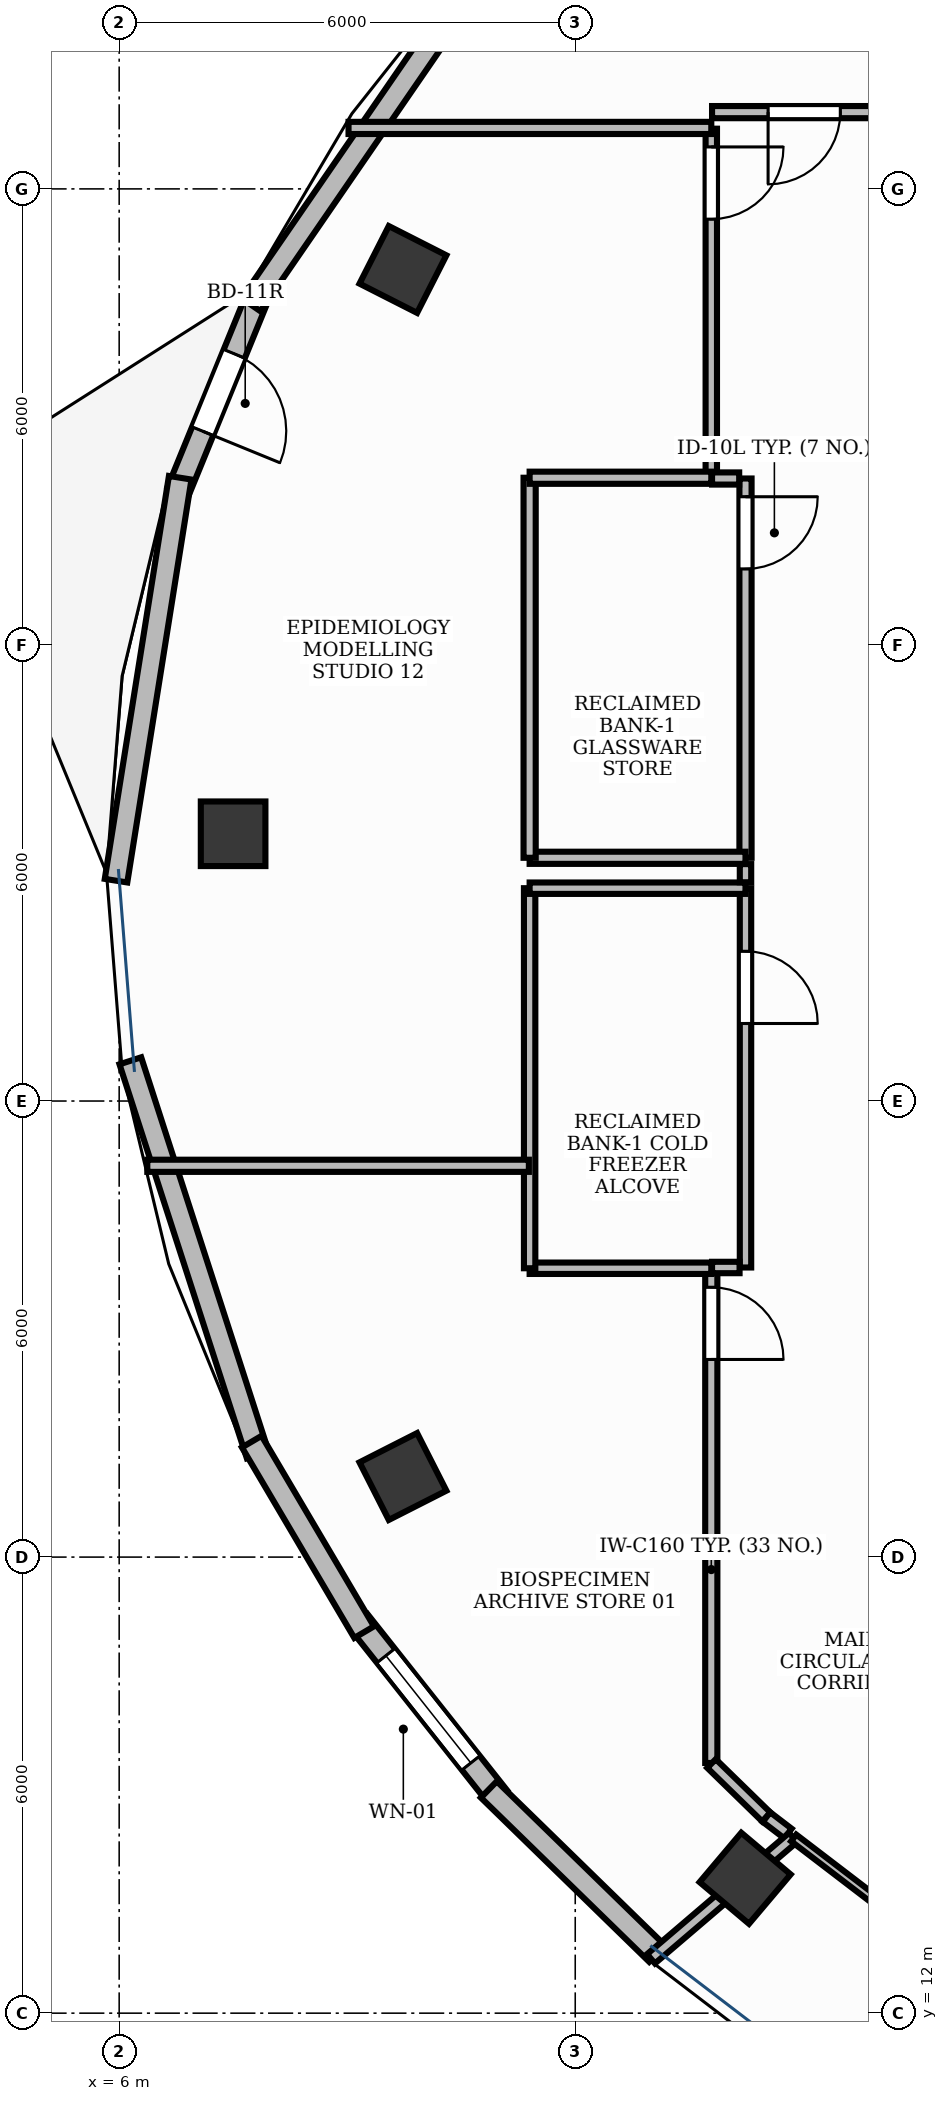
"""IFC4 building model, lengths in metres.
Left out: names, types, materials, properties, quantities, classifications, styles, units other than length and angle.
Written with IfcOpenShell. Run it as: python <this file> out.ifc"""

import sys

from ifc_helpers import new_model, si_unit, direction, frame, frame_2d, origin, origin_2d, place, context, subcontext, project, spatial, rectangle, extrude, element, fill, save


model = new_model("IFC4")
c1 = context("Model", 3, precision=1e-05, world=origin(), true_north=direction((0.0, 1.0)))
c2 = subcontext(c1, "Body", "Model", "MODEL_VIEW")
j1 = project(units=[si_unit("LENGTHUNIT", "METRE"), si_unit("PLANEANGLEUNIT", "RADIAN")], contexts=[c1])
p1 = place(None, origin())
s1 = spatial("IfcSite", under=j1, at=p1, CompositionType="ELEMENT")
p2 = place(p1, origin())
s2 = spatial("IfcBuilding", under=s1, at=p2, CompositionType="ELEMENT")
p3 = place(p2, frame((0.0, 0.0, 247.8)))
s3 = spatial("IfcBuildingStorey", under=s2, at=p3, CompositionType="ELEMENT", Elevation=247.8)
for number, where, z_axis, x_axis in (
    (1, (9.733, 34.94, -0.0), (0.0, 0.0, 1.0), (0.453, 0.891, 0.0)),
    (2, (7.499, 27.516, -0.0), (0.0, 0.0, 1.0), (0.0, 1.0, 0.0)),
    (3, (9.733, 19.06, -0.0), (0.0, 0.0, 1.0), (-0.453, 0.891, 0.0)),
    (4, (14.235, 13.775, -0.0), (0.0, 0.0, 1.0), (-0.764, 0.645, 0.0)),
):
    element("IfcColumn", number, at=place(p3, frame(where, z_axis=z_axis, x_axis=x_axis)), inside=s3, PredefinedType="COLUMN", context=c2, shape_type="SweptSolid", body=[
        extrude(rectangle(XDim=0.85, YDim=0.85, at=origin_2d()), origin(), (0.0, 0.0, 1.0), 3.901),
    ])
p4 = place(p3, frame((7.835, 34.616, 0.0), z_axis=(0.0, 0.0, 1.0), x_axis=(-0.378197778625, -0.925724818854, 0.0)))
e5 = element("IfcWall", 5, at=p4, inside=s3, PredefinedType="STANDARD", context=c2, shape_type="SweptSolid", body=[
    extrude(rectangle(XDim=2.797, YDim=0.3, at=frame_2d((1.398, 0.0))), origin(), (0.0, 0.0, 1.0), 3.9),
])
p5 = place(p4, frame((0.849, 0.0, 0.0)))
e6 = element("IfcOpeningElement", 6, at=p5, cuts=e5, PredefinedType="OPENING", context=c2, shape_type="SweptSolid", body=[
    extrude(rectangle(XDim=1.1, YDim=2.15, at=frame_2d((0.55, 1.075))), frame((0.0, 0.165, 0.0), z_axis=(0.0, -1.0, 0.0), x_axis=(1.0, 0.0, 0.0)), (0.0, 0.0, 1.0), 0.33),
])
p6 = place(p3, frame((9.15, 17.157, 0.0), z_axis=(0.0, 0.0, 1.0), x_axis=(0.620861534092, -0.783920248166, 0.0)))
e7 = element("IfcWall", 7, at=p6, inside=s3, PredefinedType="STANDARD", context=c2, shape_type="SweptSolid", body=[
    extrude(rectangle(XDim=2.957, YDim=0.3, at=frame_2d((1.479, 0.0))), origin(), (0.0, 0.0, 1.0), 3.9),
])
p7 = place(p6, frame((0.579, 0.0, 0.9)))
e8 = element("IfcOpeningElement", 8, at=p7, cuts=e7, PredefinedType="OPENING", context=c2, shape_type="SweptSolid", body=[
    extrude(rectangle(XDim=1.8, YDim=2.1, at=frame_2d((0.9, 1.05))), frame((0.0, 0.165, 0.0), z_axis=(0.0, -1.0, 0.0), x_axis=(1.0, 0.0, 0.0)), (0.0, 0.0, 1.0), 0.33),
])
p8 = place(p3, frame((10.984, 39.2, 0.0), z_axis=(0.0, 0.0, 1.0), x_axis=(-0.566669772846, -0.823945003349, 0.0)))
e9 = element("IfcWall", 9, at=p8, inside=s3, PredefinedType="STANDARD", context=c2, shape_type="SweptSolid", body=[
    extrude(rectangle(XDim=5.734, YDim=0.3, at=frame_2d((2.867, 0.0))), origin(), (0.0, 0.0, 1.0), 3.47),
])
p9 = place(p3, frame((6.803, 32.2, 0.0), z_axis=(0.0, 0.0, 1.0), x_axis=(-0.157240066957, -0.987560408959, 0.0)))
e10 = element("IfcWall", 10, at=p9, inside=s3, PredefinedType="STANDARD", context=c2, shape_type="SweptSolid", body=[
    extrude(rectangle(XDim=5.367, YDim=0.3, at=frame_2d((2.684, 0.0))), origin(), (0.0, 0.0, 1.0), 3.9),
])
p10 = place(p3, frame((6.147, 24.529, 0.0), z_axis=(0.0, 0.0, 1.0), x_axis=(0.307501658213, -0.951547544895, 0.0)))
e11 = element("IfcWall", 11, at=p10, inside=s3, PredefinedType="STANDARD", context=c2, shape_type="SweptSolid", body=[
    extrude(rectangle(XDim=5.447, YDim=0.3, at=frame_2d((2.724, 0.0))), origin(), (0.0, 0.0, 1.0), 3.9),
])
p11 = place(p3, frame((7.744, 19.519, 0.0), z_axis=(0.0, 0.0, 1.0), x_axis=(0.508064832988, -0.861318829169, 0.0)))
e12 = element("IfcWall", 12, at=p11, inside=s3, PredefinedType="STANDARD", context=c2, shape_type="SweptSolid", body=[
    extrude(rectangle(XDim=2.91, YDim=0.3, at=frame_2d((1.455, 0.0))), origin(), (0.0, 0.0, 1.0), 3.47),
])
p12 = place(p3, frame((10.863, 14.942, 0.0), z_axis=(0.0, 0.0, 1.0), x_axis=(0.71600802955, -0.698092043802, 0.0)))
e13 = element("IfcWall", 13, at=p12, inside=s3, PredefinedType="STANDARD", context=c2, shape_type="SweptSolid", body=[
    extrude(rectangle(XDim=3.093, YDim=0.3, at=frame_2d((1.547, 0.0))), origin(), (0.0, 0.0, 1.0), 3.47),
])
p13 = place(p3, frame((14.24, 26.8, 0.0), z_axis=(0.0, 0.0, 1.0), x_axis=(0.0, -1.0, 0.0)))
e14 = element("IfcWall", 14, at=p13, inside=s3, PredefinedType="PARTITIONING", context=c2, shape_type="SweptSolid", body=[
    extrude(rectangle(XDim=4.99, YDim=0.15, at=frame_2d((2.495, 0.0))), origin(), (0.0, 0.0, 1.0), 2.91),
])
p14 = place(p13, frame((0.83, 0.0, 0.0)))
e15 = element("IfcOpeningElement", 15, at=p14, cuts=e14, PredefinedType="OPENING", context=c2, shape_type="SweptSolid", body=[
    extrude(rectangle(XDim=0.95, YDim=2.15, at=frame_2d((0.475, 1.075))), frame((0.0, 0.09, 0.0), z_axis=(0.0, -1.0, 0.0), x_axis=(1.0, 0.0, 0.0)), (0.0, 0.0, 1.0), 0.18),
])
p15 = place(p3, frame((14.24, 32.19, 0.0), z_axis=(0.0, 0.0, 1.0), x_axis=(0.0, -1.0, 0.0)))
e16 = element("IfcWall", 16, at=p15, inside=s3, PredefinedType="PARTITIONING", context=c2, shape_type="SweptSolid", body=[
    extrude(rectangle(XDim=4.99, YDim=0.16, at=frame_2d((2.495, 0.0))), origin(), (0.0, 0.0, 1.0), 2.91),
])
p16 = place(p15, frame((0.24, 0.0, 0.0)))
e17 = element("IfcOpeningElement", 17, at=p16, cuts=e16, PredefinedType="OPENING", context=c2, shape_type="SweptSolid", body=[
    extrude(rectangle(XDim=0.95, YDim=2.15, at=frame_2d((0.475, 1.075))), frame((0.0, 0.095, 0.0), z_axis=(0.0, -1.0, 0.0), x_axis=(1.0, 0.0, 0.0)), (0.0, 0.0, 1.0), 0.19),
])
p17 = place(p3, frame((13.79, 21.79, 0.0), z_axis=(0.0, 0.0, 1.0), x_axis=(0.0, -1.0, 0.0)))
e18 = element("IfcWall", 18, at=p17, inside=s3, PredefinedType="PARTITIONING", context=c2, shape_type="SweptSolid", body=[
    extrude(rectangle(XDim=6.499, YDim=0.16, at=frame_2d((3.249, 0.0))), origin(), (0.0, 0.0, 1.0), 2.91),
])
p18 = place(p17, frame((0.24, 0.0, 0.0)))
e19 = element("IfcOpeningElement", 19, at=p18, cuts=e18, PredefinedType="OPENING", context=c2, shape_type="SweptSolid", body=[
    extrude(rectangle(XDim=0.95, YDim=2.15, at=frame_2d((0.475, 1.075))), frame((0.0, 0.095, 0.0), z_axis=(0.0, -1.0, 0.0), x_axis=(1.0, 0.0, 0.0)), (0.0, 0.0, 1.0), 0.19),
])
p19 = place(p3, frame((17.237, 37.01, 0.0), z_axis=(0.0, 0.0, 1.0), x_axis=(-1.0, 0.0, 0.0)))
e20 = element("IfcWall", 20, at=p19, inside=s3, PredefinedType="PARTITIONING", context=c2, shape_type="SweptSolid", body=[
    extrude(rectangle(XDim=3.437, YDim=0.16, at=frame_2d((1.718, 0.0))), origin(), (0.0, 0.0, 1.0), 2.91),
])
p20 = place(p19, frame((1.75, 0.0, 0.0)))
e21 = element("IfcOpeningElement", 21, at=p20, cuts=e20, PredefinedType="OPENING", context=c2, shape_type="SweptSolid", body=[
    extrude(rectangle(XDim=0.95, YDim=2.15, at=frame_2d((0.475, 1.075))), frame((0.0, 0.095, 0.0), z_axis=(0.0, -1.0, 0.0), x_axis=(1.0, 0.0, 0.0)), (0.0, 0.0, 1.0), 0.19),
])
p21 = place(p3, frame((13.79, 36.792, 0.0), z_axis=(0.0, 0.0, 1.0), x_axis=(0.0, -1.0, 0.0)))
e22 = element("IfcWall", 22, at=p21, inside=s3, PredefinedType="PARTITIONING", context=c2, shape_type="SweptSolid", body=[
    extrude(rectangle(XDim=4.582, YDim=0.15, at=frame_2d((2.291, 0.0))), origin(), (0.0, 0.0, 1.0), 2.91),
])
p22 = place(p21, frame((0.24, 0.0, 0.0)))
e23 = element("IfcOpeningElement", 23, at=p22, cuts=e22, PredefinedType="OPENING", context=c2, shape_type="SweptSolid", body=[
    extrude(rectangle(XDim=0.95, YDim=2.15, at=frame_2d((0.475, 1.075))), frame((0.0, 0.09, 0.0), z_axis=(0.0, -1.0, 0.0), x_axis=(1.0, 0.0, 0.0)), (0.0, 0.0, 1.0), 0.18),
])
p23 = place(p3, frame((14.162, 21.81, 0.0), z_axis=(0.0, 0.0, 1.0), x_axis=(-1.0, 0.0, 0.0)))
e24 = element("IfcWall", 24, at=p23, inside=s3, PredefinedType="PARTITIONING", context=c2, shape_type="SweptSolid", body=[
    extrude(rectangle(XDim=0.362, YDim=0.15, at=frame_2d((0.181, 0.0))), origin(), (0.0, 0.0, 1.0), 2.91),
])
p24 = place(p3, frame((13.79, 21.8, 0.0), z_axis=(0.0, 0.0, 1.0), x_axis=(-1.0, 0.0, 0.0)))
e25 = element("IfcWall", 25, at=p24, inside=s3, PredefinedType="PARTITIONING", context=c2, shape_type="SweptSolid", body=[
    extrude(rectangle(XDim=2.39, YDim=0.15, at=frame_2d((1.195, 0.0))), origin(), (0.0, 0.0, 1.0), 2.91),
])
p25 = place(p3, frame((11.4, 21.8, 0.0), z_axis=(0.0, 0.0, 1.0), x_axis=(0.0, 1.0, 0.0)))
e26 = element("IfcWall", 26, at=p25, inside=s3, PredefinedType="PARTITIONING", context=c2, shape_type="SweptSolid", body=[
    extrude(rectangle(XDim=5.0, YDim=0.15, at=frame_2d((2.5, 0.0))), origin(), (0.0, 0.0, 1.0), 2.91),
])
p26 = place(p3, frame((11.4, 26.8, 0.0), z_axis=(0.0, 0.0, 1.0), x_axis=(1.0, 0.0, 0.0)))
e27 = element("IfcWall", 27, at=p26, inside=s3, PredefinedType="PARTITIONING", context=c2, shape_type="SweptSolid", body=[
    extrude(rectangle(XDim=2.84, YDim=0.15, at=frame_2d((1.42, 0.0))), origin(), (0.0, 0.0, 1.0), 2.91),
])
p27 = place(p3, frame((13.8, 32.19, 0.0), z_axis=(0.0, 0.0, 1.0), x_axis=(1.0, 0.0, 0.0)))
e28 = element("IfcWall", 28, at=p27, inside=s3, PredefinedType="PARTITIONING", context=c2, shape_type="SweptSolid", body=[
    extrude(rectangle(XDim=0.357, YDim=0.16, at=frame_2d((0.178, 0.0))), origin(), (0.0, 0.0, 1.0), 2.91),
])
p28 = place(p3, frame((14.24, 27.2, 0.0), z_axis=(0.0, 0.0, 1.0), x_axis=(-1.0, 0.0, 0.0)))
e29 = element("IfcWall", 29, at=p28, inside=s3, PredefinedType="PARTITIONING", context=c2, shape_type="SweptSolid", body=[
    extrude(rectangle(XDim=2.84, YDim=0.16, at=frame_2d((1.42, 0.0))), origin(), (0.0, 0.0, 1.0), 2.91),
])
p29 = place(p3, frame((11.4, 27.2, 0.0), z_axis=(0.0, 0.0, 1.0), x_axis=(0.0, 1.0, 0.0)))
e30 = element("IfcWall", 30, at=p29, inside=s3, PredefinedType="PARTITIONING", context=c2, shape_type="SweptSolid", body=[
    extrude(rectangle(XDim=5.0, YDim=0.16, at=frame_2d((2.5, 0.0))), origin(), (0.0, 0.0, 1.0), 2.91),
])
p30 = place(p3, frame((11.4, 32.2, 0.0), z_axis=(0.0, 0.0, 1.0), x_axis=(1.0, 0.0, 0.0)))
e31 = element("IfcWall", 31, at=p30, inside=s3, PredefinedType="PARTITIONING", context=c2, shape_type="SweptSolid", body=[
    extrude(rectangle(XDim=2.39, YDim=0.16, at=frame_2d((1.195, 0.0))), origin(), (0.0, 0.0, 1.0), 2.91),
])
p31 = place(p3, frame((6.37, 23.148, 0.0), z_axis=(0.0, 0.0, 1.0), x_axis=(1.0, 0.0, 0.0)))
e32 = element("IfcWall", 32, at=p31, inside=s3, PredefinedType="PARTITIONING", context=c2, shape_type="SweptSolid", body=[
    extrude(rectangle(XDim=5.02, YDim=0.16, at=frame_2d((2.51, 0.0))), origin(), (0.0, 0.0, 1.0), 2.91),
])
p32 = place(p3, frame((13.793, 15.284, 0.0), z_axis=(0.0, 0.0, 1.0), x_axis=(0.7160122468, -0.698087718294, 0.0)))
e33 = element("IfcWall", 33, at=p32, inside=s3, PredefinedType="PARTITIONING", context=c2, shape_type="SweptSolid", body=[
    extrude(rectangle(XDim=1.008, YDim=0.16, at=frame_2d((0.504, 0.0))), origin(), (0.0, 0.0, 1.0), 2.91),
])
p33 = place(p3, frame((14.516, 14.58, 0.0), z_axis=(0.0, 0.0, 1.0), x_axis=(0.794124394036, -0.607755252381, 0.0)))
e34 = element("IfcWall", 34, at=p33, inside=s3, PredefinedType="PARTITIONING", context=c2, shape_type="SweptSolid", body=[
    extrude(rectangle(XDim=0.356, YDim=0.16, at=frame_2d((0.178, 0.0))), origin(), (0.0, 0.0, 1.0), 2.91),
])
p34 = place(p3, frame((14.866, 14.312, 0.0), z_axis=(0.0, 0.0, 1.0), x_axis=(-0.760432930585, -0.649416475062, 0.0)))
e35 = element("IfcWall", 35, at=p34, inside=s3, PredefinedType="PARTITIONING", context=c2, shape_type="SweptSolid", body=[
    extrude(rectangle(XDim=2.459, YDim=0.16, at=frame_2d((1.229, 0.0))), origin(), (0.0, 0.0, 1.0), 2.91),
])
p35 = place(p3, frame((14.874, 14.306, 0.0), z_axis=(0.0, 0.0, 1.0), x_axis=(0.794366882066, -0.607438273965, 0.0)))
e36 = element("IfcWall", 36, at=p35, inside=s3, PredefinedType="MOVABLE", context=c2, shape_type="SweptSolid", body=[
    extrude(rectangle(XDim=2.297, YDim=0.11, at=frame_2d((1.149, 0.0))), origin(), (0.0, 0.0, 1.0), 2.91),
])
p36 = place(p3, frame((17.253, 37.01, 0.0), z_axis=(0.0, 0.0, 1.0), x_axis=(-0.779948830135, 0.625843288987, 0.0)))
e37 = element("IfcWall", 37, at=p36, inside=s3, PredefinedType="PARTITIONING", context=c2, shape_type="SweptSolid", body=[
    extrude(rectangle(XDim=6.09, YDim=0.15, at=frame_2d((3.045, 0.0))), origin(), (0.0, 0.0, 1.0), 2.91),
])
p37 = place(p3, frame((13.79, 36.802, 0.0), z_axis=(0.0, 0.0, 1.0), x_axis=(-1.0, 0.0, 0.0)))
e38 = element("IfcWall", 38, at=p37, inside=s3, PredefinedType="PARTITIONING", context=c2, shape_type="SweptSolid", body=[
    extrude(rectangle(XDim=4.772, YDim=0.16, at=frame_2d((2.386, 0.0))), origin(), (0.0, 0.0, 1.0), 2.91),
])
p38 = place(p3, frame((14.24, 27.117, 0.0), z_axis=(0.0, 0.0, 1.0), x_axis=(0.0, -1.0, 0.0)))
e39 = element("IfcWall", 39, at=p38, inside=s3, PredefinedType="PARTITIONING", context=c2, shape_type="SweptSolid", body=[
    extrude(rectangle(XDim=0.239, YDim=0.15, at=frame_2d((0.12, 0.0))), origin(), (0.0, 0.0, 1.0), 2.91),
])
p39 = place(p5, origin())
e40 = element("IfcDoor", 40, at=p39, inside=s3, OperationType="SINGLE_SWING_RIGHT", PredefinedType="DOOR", context=c2, shape_type="SweptSolid", body=[
    extrude(rectangle(XDim=1.1, YDim=2.15, at=frame_2d((0.55, 1.075))), frame((0.0, 0.025, 0.0), z_axis=(0.0, -1.0, 0.0), x_axis=(1.0, 0.0, 0.0)), (0.0, 0.0, 1.0), 0.05),
])
fill(e6, e40)
p40 = place(p7, origin())
e41 = element("IfcWindow", 41, at=p40, inside=s3, PartitioningType="SINGLE_PANEL", PredefinedType="WINDOW", context=c2, shape_type="SweptSolid", body=[
    extrude(rectangle(XDim=1.8, YDim=2.1, at=frame_2d((0.9, 1.05))), frame((0.0, 0.03, 0.0), z_axis=(0.0, -1.0, 0.0), x_axis=(1.0, 0.0, 0.0)), (0.0, 0.0, 1.0), 0.06),
])
fill(e8, e41)
p41 = place(p14, origin())
e42 = element("IfcDoor", 42, at=p41, inside=s3, OperationType="SINGLE_SWING_RIGHT", PredefinedType="DOOR", context=c2, shape_type="SweptSolid", body=[
    extrude(rectangle(XDim=0.95, YDim=2.15, at=frame_2d((0.475, 1.075))), frame((0.0, 0.025, 0.0), z_axis=(0.0, -1.0, 0.0), x_axis=(1.0, 0.0, 0.0)), (0.0, 0.0, 1.0), 0.05),
])
fill(e15, e42)
p42 = place(p16, origin())
e43 = element("IfcDoor", 43, at=p42, inside=s3, OperationType="SINGLE_SWING_LEFT", PredefinedType="DOOR", context=c2, shape_type="SweptSolid", body=[
    extrude(rectangle(XDim=0.95, YDim=2.15, at=frame_2d((0.475, 1.075))), frame((0.0, 0.025, 0.0), z_axis=(0.0, -1.0, 0.0), x_axis=(1.0, 0.0, 0.0)), (0.0, 0.0, 1.0), 0.05),
])
fill(e17, e43)
p43 = place(p18, origin())
e44 = element("IfcDoor", 44, at=p43, inside=s3, OperationType="SINGLE_SWING_RIGHT", PredefinedType="DOOR", context=c2, shape_type="SweptSolid", body=[
    extrude(rectangle(XDim=0.95, YDim=2.15, at=frame_2d((0.475, 1.075))), frame((0.0, 0.025, 0.0), z_axis=(0.0, -1.0, 0.0), x_axis=(1.0, 0.0, 0.0)), (0.0, 0.0, 1.0), 0.05),
])
fill(e19, e44)
p44 = place(p20, origin())
e45 = element("IfcDoor", 45, at=p44, inside=s3, OperationType="SINGLE_SWING_RIGHT", PredefinedType="DOOR", context=c2, shape_type="SweptSolid", body=[
    extrude(rectangle(XDim=0.95, YDim=2.15, at=frame_2d((0.475, 1.075))), frame((0.0, 0.025, 0.0), z_axis=(0.0, -1.0, 0.0), x_axis=(1.0, 0.0, 0.0)), (0.0, 0.0, 1.0), 0.05),
])
fill(e21, e45)
p45 = place(p22, origin())
e46 = element("IfcDoor", 46, at=p45, inside=s3, OperationType="SINGLE_SWING_LEFT", PredefinedType="DOOR", context=c2, shape_type="SweptSolid", body=[
    extrude(rectangle(XDim=0.95, YDim=2.15, at=frame_2d((0.475, 1.075))), frame((0.0, 0.025, 0.0), z_axis=(0.0, -1.0, 0.0), x_axis=(1.0, 0.0, 0.0)), (0.0, 0.0, 1.0), 0.05),
])
fill(e23, e46)
save(model, sys.argv[1])
